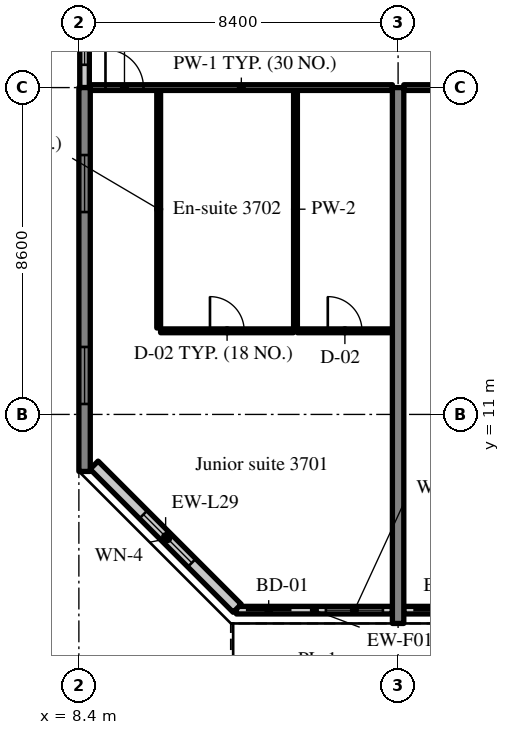
"""IFC4 building model, lengths in metres.
Left out: names, types, materials, properties, quantities, classifications, styles, units other than length and angle.
Written with IfcOpenShell. Run it as: python <this file> out.ifc"""

import sys

from ifc_helpers import new_model, si_unit, direction, frame, frame_2d, origin, place, context, subcontext, project, spatial, rectangle, extrude, source, transform, mapped, element, fill, save


model = new_model("IFC4")
c1 = context("Model", 3, precision=1e-05, world=origin(), true_north=direction((0.0, 1.0)))
c2 = subcontext(c1, "Body", "Model", "MODEL_VIEW")
j1 = project(units=[si_unit("LENGTHUNIT", "METRE"), si_unit("PLANEANGLEUNIT", "RADIAN")], contexts=[c1])
p1 = place(None, origin())
s1 = spatial("IfcSite", under=j1, at=p1, CompositionType="ELEMENT")
p2 = place(p1, origin())
s2 = spatial("IfcBuilding", under=s1, at=p2, CompositionType="ELEMENT")
p3 = place(p2, frame((0.0, 0.0, 155.4)))
s3 = spatial("IfcBuildingStorey", under=s2, at=p3, CompositionType="ELEMENT", Elevation=155.4)
m1 = source(origin(), c2, "Body", "SweptSolid", [
    extrude(rectangle(XDim=10.1, YDim=0.3, at=frame_2d((5.05, 0.0))), origin(), (0.0, 0.0, 1.0), 3.52),
])
p4 = place(p3, frame((8.55, 9.5, 0.0), z_axis=(0.0, 0.0, 1.0), x_axis=(0.0, 1.0, 0.0)))
e1 = element("IfcWall", 1, at=p4, inside=s3, PredefinedType="SHEAR", context=c2, shape_type="MappedRepresentation", body=[
    mapped(m1, transform((0.0, 0.0, 0.0), scale=1.0)),
])
m2 = source(origin(), c2, "Body", "SweptSolid", [
    extrude(rectangle(XDim=1.5, YDim=1.5, at=frame_2d((0.75, 0.75))), frame((0.0, 0.16, 0.0), z_axis=(0.0, -1.0, 0.0), x_axis=(1.0, 0.0, 0.0)), (0.0, 0.0, 1.0), 0.32),
])
p5 = place(p4, frame((1.775, 0.0, 0.9)))
e2 = element("IfcOpeningElement", 2, at=p5, cuts=e1, PredefinedType="OPENING", context=c2, shape_type="MappedRepresentation", body=[
    mapped(m2, transform((0.0, 0.0, 0.0), scale=1.0)),
])
p6 = place(p4, frame((6.825, 0.0, 0.9)))
e3 = element("IfcOpeningElement", 3, at=p6, cuts=e1, PredefinedType="OPENING", context=c2, shape_type="MappedRepresentation", body=[
    mapped(m2, transform((0.0, 0.0, 0.0), scale=1.0)),
])
m3 = source(origin(), c2, "Body", "SweptSolid", [
    extrude(rectangle(XDim=14.1, YDim=0.3, at=frame_2d((7.05, 0.0))), origin(), (0.0, 0.0, 1.0), 3.52),
])
p7 = place(p3, frame((16.8, 5.5, 0.0), z_axis=(0.0, 0.0, 1.0), x_axis=(0.0, 1.0, 0.0)))
e4 = element("IfcWall", 4, at=p7, inside=s3, PredefinedType="SHEAR", context=c2, shape_type="MappedRepresentation", body=[
    mapped(m3, transform((0.0, 0.0, 0.0), scale=1.0)),
])
m4 = source(origin(), c2, "Body", "SweptSolid", [
    extrude(rectangle(XDim=4.105, YDim=0.2, at=frame_2d((2.052, 0.0))), origin(), (0.0, 0.0, 1.0), 2.87),
])
p8 = place(p3, frame((12.545, 5.85, 0.0), z_axis=(0.0, 0.0, 1.0), x_axis=(1.0, 0.0, 0.0)))
e5 = element("IfcWall", 5, at=p8, inside=s3, PredefinedType="SOLIDWALL", context=c2, shape_type="MappedRepresentation", body=[
    mapped(m4, transform((0.0, 0.0, 0.0), scale=1.0)),
])
m5 = source(origin(), c2, "Body", "SweptSolid", [
    extrude(rectangle(XDim=1.2, YDim=2.4, at=frame_2d((0.6, 1.2))), frame((0.0, 0.11, 0.0), z_axis=(0.0, -1.0, 0.0), x_axis=(1.0, 0.0, 0.0)), (0.0, 0.0, 1.0), 0.22),
])
p9 = place(p8, frame((0.25, 0.0, 0.0)))
e6 = element("IfcOpeningElement", 6, at=p9, cuts=e5, PredefinedType="OPENING", context=c2, shape_type="MappedRepresentation", body=[
    mapped(m5, transform((0.0, 0.0, 0.0), scale=1.0)),
])
m6 = source(origin(), c2, "Body", "SweptSolid", [
    extrude(rectangle(XDim=1.5, YDim=1.5, at=frame_2d((0.75, 0.75))), frame((0.0, 0.11, 0.0), z_axis=(0.0, -1.0, 0.0), x_axis=(1.0, 0.0, 0.0)), (0.0, 0.0, 1.0), 0.22),
])
p10 = place(p8, frame((2.355, 0.0, 0.9)))
e7 = element("IfcOpeningElement", 7, at=p10, cuts=e5, PredefinedType="OPENING", context=c2, shape_type="MappedRepresentation", body=[
    mapped(m6, transform((0.0, 0.0, 0.0), scale=1.0)),
])
m7 = source(origin(), c2, "Body", "SweptSolid", [
    extrude(rectangle(XDim=8.1, YDim=0.2, at=frame_2d((4.05, 0.0))), origin(), (0.0, 0.0, 1.0), 2.87),
])
p11 = place(p3, frame((16.95, 5.85, 0.0), z_axis=(0.0, 0.0, 1.0), x_axis=(1.0, 0.0, 0.0)))
e8 = element("IfcWall", 8, at=p11, inside=s3, PredefinedType="SOLIDWALL", context=c2, shape_type="MappedRepresentation", body=[
    mapped(m7, transform((0.0, 0.0, 0.0), scale=1.0)),
])
p12 = place(p11, frame((0.25, 0.0, 0.0)))
e9 = element("IfcOpeningElement", 9, at=p12, cuts=e8, PredefinedType="OPENING", context=c2, shape_type="MappedRepresentation", body=[
    mapped(m5, transform((0.0, 0.0, 0.0), scale=1.0)),
])
p13 = place(p11, frame((2.3, 0.0, 0.9)))
e10 = element("IfcOpeningElement", 10, at=p13, cuts=e8, PredefinedType="OPENING", context=c2, shape_type="MappedRepresentation", body=[
    mapped(m6, transform((0.0, 0.0, 0.0), scale=1.0)),
])
p14 = place(p11, frame((4.3, 0.0, 0.0)))
e11 = element("IfcOpeningElement", 11, at=p14, cuts=e8, PredefinedType="OPENING", context=c2, shape_type="MappedRepresentation", body=[
    mapped(m5, transform((0.0, 0.0, 0.0), scale=1.0)),
])
p15 = place(p11, frame((6.35, 0.0, 0.9)))
e12 = element("IfcOpeningElement", 12, at=p15, cuts=e8, PredefinedType="OPENING", context=c2, shape_type="MappedRepresentation", body=[
    mapped(m6, transform((0.0, 0.0, 0.0), scale=1.0)),
])
m8 = source(origin(), c2, "Body", "SweptSolid", [
    extrude(rectangle(XDim=5.326, YDim=0.3, at=frame_2d((2.663, 0.0))), origin(), (0.0, 0.0, 1.0), 3.52),
])
p16 = place(p3, frame((8.8, 9.666, 0.0), z_axis=(0.0, 0.0, 1.0), x_axis=(0.707083859269, -0.707129702361, 0.0)))
e13 = element("IfcWall", 13, at=p16, inside=s3, PredefinedType="SOLIDWALL", context=c2, shape_type="MappedRepresentation", body=[
    mapped(m8, transform((0.0, 0.0, 0.0), scale=1.0)),
])
m9 = source(origin(), c2, "Body", "SweptSolid", [
    extrude(rectangle(XDim=1.8, YDim=1.5, at=frame_2d((0.9, 0.75))), frame((0.0, 0.16, 0.0), z_axis=(0.0, -1.0, 0.0), x_axis=(1.0, 0.0, 0.0)), (0.0, 0.0, 1.0), 0.32),
])
p17 = place(p16, frame((1.836, 0.0, 0.9)))
e14 = element("IfcOpeningElement", 14, at=p17, cuts=e13, PredefinedType="OPENING", context=c2, shape_type="MappedRepresentation", body=[
    mapped(m9, transform((0.0, 0.0, 0.0), scale=1.0)),
])
m10 = source(origin(), c2, "Body", "SweptSolid", [
    extrude(rectangle(XDim=2.4, YDim=0.25, at=frame_2d((1.2, 0.0))), origin(), (0.0, 0.0, 1.0), 2.62),
])
p18 = place(p3, frame((8.55, 19.6, 0.0), z_axis=(0.0, 0.0, 1.0), x_axis=(0.0, 1.0, 0.0)))
e15 = element("IfcWall", 15, at=p18, inside=s3, PredefinedType="SOLIDWALL", context=c2, shape_type="MappedRepresentation", body=[
    mapped(m10, transform((0.0, 0.0, 0.0), scale=1.0)),
])
m11 = source(origin(), c2, "Body", "SweptSolid", [
    extrude(rectangle(XDim=1.2, YDim=1.5, at=frame_2d((0.6, 0.75))), frame((0.0, 0.135, 0.0), z_axis=(0.0, -1.0, 0.0), x_axis=(1.0, 0.0, 0.0)), (0.0, 0.0, 1.0), 0.27),
])
p19 = place(p18, frame((0.6, 0.0, 0.9)))
e16 = element("IfcOpeningElement", 16, at=p19, cuts=e15, PredefinedType="OPENING", context=c2, shape_type="MappedRepresentation", body=[
    mapped(m11, transform((0.0, 0.0, 0.0), scale=1.0)),
])
m12 = source(origin(), c2, "Body", "SweptSolid", [
    extrude(rectangle(XDim=6.25, YDim=0.1, at=frame_2d((3.125, 0.0))), origin(), (0.0, 0.0, 1.0), 3.52),
])
for number, where, z_axis, x_axis in (
    (17, (10.5, 13.275, 0.0), (0.0, 0.0, 1.0), (0.0, 1.0, 0.0)),
    (18, (14.1, 13.275, 0.0), (0.0, 0.0, 1.0), (0.0, 1.0, 0.0)),
):
    element("IfcWall", number, at=place(p3, frame(where, z_axis=z_axis, x_axis=x_axis)), inside=s3, PredefinedType="PARTITIONING", context=c2, shape_type="MappedRepresentation", body=[
        mapped(m12, transform((0.0, 0.0, 0.0), scale=1.0)),
    ])
m13 = source(origin(), c2, "Body", "SweptSolid", [
    extrude(rectangle(XDim=3.5, YDim=0.1, at=frame_2d((1.75, 0.0))), origin(), (0.0, 0.0, 1.0), 3.52),
])
p20 = place(p3, frame((10.55, 13.2, 0.0), z_axis=(0.0, 0.0, 1.0), x_axis=(1.0, 0.0, 0.0)))
e19 = element("IfcWall", 19, at=p20, inside=s3, PredefinedType="PARTITIONING", context=c2, shape_type="MappedRepresentation", body=[
    mapped(m13, transform((0.0, 0.0, 0.0), scale=1.0)),
])
m14 = source(origin(), c2, "Body", "SweptSolid", [
    extrude(rectangle(XDim=0.9, YDim=2.1, at=frame_2d((0.45, 1.05))), frame((0.0, 0.06, 0.0), z_axis=(0.0, -1.0, 0.0), x_axis=(1.0, 0.0, 0.0)), (0.0, 0.0, 1.0), 0.12),
])
p21 = place(p20, frame((1.3, 0.0, 0.0)))
e20 = element("IfcOpeningElement", 20, at=p21, cuts=e19, PredefinedType="OPENING", context=c2, shape_type="MappedRepresentation", body=[
    mapped(m14, transform((0.0, 0.0, 0.0), scale=1.0)),
])
m15 = source(origin(), c2, "Body", "SweptSolid", [
    extrude(rectangle(XDim=2.5, YDim=0.1, at=frame_2d((1.25, 0.0))), origin(), (0.0, 0.0, 1.0), 3.52),
])
p22 = place(p3, frame((14.15, 13.2, 0.0), z_axis=(0.0, 0.0, 1.0), x_axis=(1.0, 0.0, 0.0)))
e21 = element("IfcWall", 21, at=p22, inside=s3, PredefinedType="PARTITIONING", context=c2, shape_type="MappedRepresentation", body=[
    mapped(m15, transform((0.0, 0.0, 0.0), scale=1.0)),
])
p23 = place(p22, frame((0.8, 0.0, 0.0)))
e22 = element("IfcOpeningElement", 22, at=p23, cuts=e21, PredefinedType="OPENING", context=c2, shape_type="MappedRepresentation", body=[
    mapped(m14, transform((0.0, 0.0, 0.0), scale=1.0)),
])
m16 = source(origin(), c2, "Body", "SweptSolid", [
    extrude(rectangle(XDim=7.95, YDim=0.15, at=frame_2d((3.975, 0.0))), origin(), (0.0, 0.0, 1.0), 2.82),
])
p24 = place(p3, frame((8.7, 19.6, 0.0), z_axis=(0.0, 0.0, 1.0), x_axis=(1.0, 0.0, 0.0)))
e23 = element("IfcWall", 23, at=p24, inside=s3, PredefinedType="PARTITIONING", context=c2, shape_type="MappedRepresentation", body=[
    mapped(m16, transform((0.0, 0.0, 0.0), scale=1.0)),
])
m17 = source(origin(), c2, "Body", "SweptSolid", [
    extrude(rectangle(XDim=1.0, YDim=2.1, at=frame_2d((0.5, 1.05))), frame((0.0, 0.085, 0.0), z_axis=(0.0, -1.0, 0.0), x_axis=(1.0, 0.0, 0.0)), (0.0, 0.0, 1.0), 0.17),
])
p25 = place(p24, frame((0.4, 0.0, 0.0)))
e24 = element("IfcOpeningElement", 24, at=p25, cuts=e23, PredefinedType="OPENING", context=c2, shape_type="MappedRepresentation", body=[
    mapped(m17, transform((0.0, 0.0, 0.0), scale=1.0)),
])
m18 = source(origin(), c2, "Body", "SweptSolid", [
    extrude(rectangle(XDim=8.1, YDim=0.15, at=frame_2d((4.05, 0.0))), origin(), (0.0, 0.0, 1.0), 2.82),
])
p26 = place(p3, frame((16.95, 19.6, 0.0), z_axis=(0.0, 0.0, 1.0), x_axis=(1.0, 0.0, 0.0)))
e25 = element("IfcWall", 25, at=p26, inside=s3, PredefinedType="PARTITIONING", context=c2, shape_type="MappedRepresentation", body=[
    mapped(m18, transform((0.0, 0.0, 0.0), scale=1.0)),
])
m19 = source(origin(), c2, "Body", "SweptSolid", [
    extrude(rectangle(XDim=1.8, YDim=2.1, at=frame_2d((0.9, 1.05))), frame((0.0, 0.085, 0.0), z_axis=(0.0, -1.0, 0.0), x_axis=(1.0, 0.0, 0.0)), (0.0, 0.0, 1.0), 0.17),
])
p27 = place(p26, frame((3.15, 0.0, 0.0)))
e26 = element("IfcOpeningElement", 26, at=p27, cuts=e25, PredefinedType="OPENING", context=c2, shape_type="MappedRepresentation", body=[
    mapped(m19, transform((0.0, 0.0, 0.0), scale=1.0)),
])
m20 = source(origin(), c2, "Body", "SweptSolid", [
    extrude(rectangle(XDim=1.2, YDim=2.4, at=frame_2d((0.6, 1.2))), frame((0.0, 0.025, 0.0), z_axis=(0.0, -1.0, 0.0), x_axis=(1.0, 0.0, 0.0)), (0.0, 0.0, 1.0), 0.05),
])
p28 = place(p9, origin())
e27 = element("IfcDoor", 27, at=p28, inside=s3, OperationType="SLIDING_TO_LEFT", PredefinedType="DOOR", context=c2, shape_type="MappedRepresentation", body=[
    mapped(m20, transform((0.0, 0.0, 0.0), scale=1.0)),
])
fill(e6, e27)
m21 = source(origin(), c2, "Body", "SweptSolid", [
    extrude(rectangle(XDim=1.5, YDim=1.5, at=frame_2d((0.75, 0.75))), frame((0.0, 0.03, 0.0), z_axis=(0.0, -1.0, 0.0), x_axis=(1.0, 0.0, 0.0)), (0.0, 0.0, 1.0), 0.06),
])
p29 = place(p10, origin())
e28 = element("IfcWindow", 28, at=p29, inside=s3, PartitioningType="SINGLE_PANEL", PredefinedType="WINDOW", context=c2, shape_type="MappedRepresentation", body=[
    mapped(m21, transform((0.0, 0.0, 0.0), scale=1.0)),
])
fill(e7, e28)
p30 = place(p12, origin())
e29 = element("IfcDoor", 29, at=p30, inside=s3, OperationType="SLIDING_TO_RIGHT", PredefinedType="DOOR", context=c2, shape_type="MappedRepresentation", body=[
    mapped(m20, transform((0.0, 0.0, 0.0), scale=1.0)),
])
fill(e9, e29)
m22 = source(origin(), c2, "Body", "SweptSolid", [
    extrude(rectangle(XDim=1.8, YDim=1.5, at=frame_2d((0.9, 0.75))), frame((0.0, 0.03, 0.0), z_axis=(0.0, -1.0, 0.0), x_axis=(1.0, 0.0, 0.0)), (0.0, 0.0, 1.0), 0.06),
])
p31 = place(p17, origin())
e30 = element("IfcWindow", 30, at=p31, inside=s3, PartitioningType="SINGLE_PANEL", PredefinedType="WINDOW", context=c2, shape_type="MappedRepresentation", body=[
    mapped(m22, transform((0.0, 0.0, 0.0), scale=1.0)),
])
fill(e14, e30)
p32 = place(p5, origin())
e31 = element("IfcWindow", 31, at=p32, inside=s3, PartitioningType="SINGLE_PANEL", PredefinedType="WINDOW", context=c2, shape_type="MappedRepresentation", body=[
    mapped(m21, transform((0.0, 0.0, 0.0), scale=1.0)),
])
fill(e2, e31)
p33 = place(p6, origin())
e32 = element("IfcWindow", 32, at=p33, inside=s3, PartitioningType="SINGLE_PANEL", PredefinedType="WINDOW", context=c2, shape_type="MappedRepresentation", body=[
    mapped(m21, transform((0.0, 0.0, 0.0), scale=1.0)),
])
fill(e3, e32)
m23 = source(origin(), c2, "Body", "SweptSolid", [
    extrude(rectangle(XDim=1.2, YDim=1.5, at=frame_2d((0.6, 0.75))), frame((0.0, 0.03, 0.0), z_axis=(0.0, -1.0, 0.0), x_axis=(1.0, 0.0, 0.0)), (0.0, 0.0, 1.0), 0.06),
])
p34 = place(p19, origin())
e33 = element("IfcWindow", 33, at=p34, inside=s3, PartitioningType="SINGLE_PANEL", PredefinedType="WINDOW", context=c2, shape_type="MappedRepresentation", body=[
    mapped(m23, transform((0.0, 0.0, 0.0), scale=1.0)),
])
fill(e16, e33)
m24 = source(origin(), c2, "Body", "SweptSolid", [
    extrude(rectangle(XDim=0.9, YDim=2.1, at=frame_2d((0.45, 1.05))), frame((0.0, 0.025, 0.0), z_axis=(0.0, -1.0, 0.0), x_axis=(1.0, 0.0, 0.0)), (0.0, 0.0, 1.0), 0.05),
])
p35 = place(p21, origin())
e34 = element("IfcDoor", 34, at=p35, inside=s3, OperationType="SINGLE_SWING_LEFT", PredefinedType="DOOR", context=c2, shape_type="MappedRepresentation", body=[
    mapped(m24, transform((0.0, 0.0, 0.0), scale=1.0)),
])
fill(e20, e34)
p36 = place(p23, origin())
e35 = element("IfcDoor", 35, at=p36, inside=s3, OperationType="SINGLE_SWING_LEFT", PredefinedType="DOOR", context=c2, shape_type="MappedRepresentation", body=[
    mapped(m24, transform((0.0, 0.0, 0.0), scale=1.0)),
])
fill(e22, e35)
m25 = source(origin(), c2, "Body", "SweptSolid", [
    extrude(rectangle(XDim=1.0, YDim=2.1, at=frame_2d((0.5, 1.05))), frame((0.0, 0.025, 0.0), z_axis=(0.0, -1.0, 0.0), x_axis=(1.0, 0.0, 0.0)), (0.0, 0.0, 1.0), 0.05),
])
p37 = place(p25, origin())
e36 = element("IfcDoor", 36, at=p37, inside=s3, OperationType="SINGLE_SWING_LEFT", PredefinedType="DOOR", context=c2, shape_type="MappedRepresentation", body=[
    mapped(m25, transform((0.0, 0.0, 0.0), scale=1.0)),
])
fill(e24, e36)
save(model, sys.argv[1])
